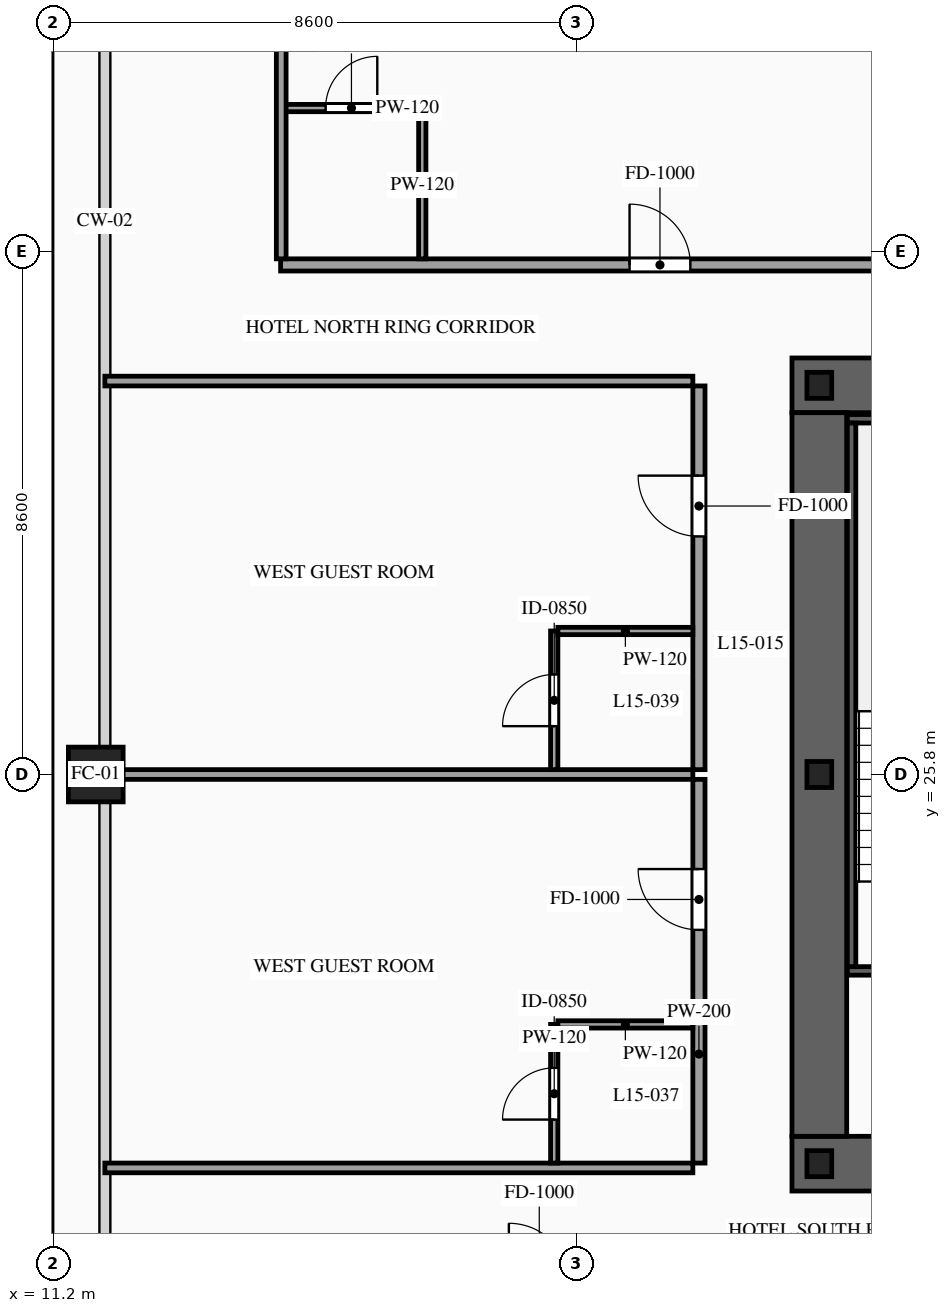
"""IFC4 building model, lengths in metres.
Left out: names, types, materials, properties, quantities, classifications, styles, units other than length and angle.
Written with IfcOpenShell. Run it as: python <this file> out.ifc"""

import sys

from ifc_helpers import new_model, si_unit, direction, frame, frame_2d, origin, origin_2d, place, context, subcontext, project, spatial, rectangle, hollow_rectangle, i_section, extrude, source, transform, mapped, element, fill, save


model = new_model("IFC4")
c1 = context("Model", 3, precision=1e-05, world=origin(), true_north=direction((0.0, 1.0)))
c2 = subcontext(c1, "Body", "Model", "MODEL_VIEW")
j1 = project(units=[si_unit("LENGTHUNIT", "METRE"), si_unit("PLANEANGLEUNIT", "RADIAN")], contexts=[c1])
p1 = place(None, origin())
s1 = spatial("IfcSite", under=j1, at=p1, CompositionType="ELEMENT")
p2 = place(p1, origin())
s2 = spatial("IfcBuilding", under=s1, at=p2, CompositionType="ELEMENT")
p3 = place(p2, frame((0.0, 0.0, 60.4)))
s3 = spatial("IfcBuildingStorey", under=s2, at=p3, CompositionType="ELEMENT", Elevation=60.4)
p4 = place(p3, frame((23.35, 19.4, 0.0), z_axis=(0.0, 0.0, 1.0), x_axis=(1.0, 0.0, 0.0)))
e1 = element("IfcWall", 1, at=p4, inside=s3, PredefinedType="SHEAR", context=c2, shape_type="SweptSolid", body=[
    extrude(rectangle(XDim=27.3, YDim=0.9, at=frame_2d((13.65, 0.0))), origin(), (0.0, 0.0, 1.0), 3.6),
])
p5 = place(p4, frame((2.1, 0.0, 0.0)))
e2 = element("IfcOpeningElement", 2, at=p5, cuts=e1, PredefinedType="OPENING", context=c2, shape_type="SweptSolid", body=[
    extrude(rectangle(XDim=1.1, YDim=2.2, at=frame_2d((0.55, 1.1))), frame((0.0, 0.465, 0.0), z_axis=(0.0, -1.0, 0.0), x_axis=(1.0, 0.0, 0.0)), (0.0, 0.0, 1.0), 0.93),
])
p6 = place(p4, frame((10.0, 0.0, 0.0)))
e3 = element("IfcOpeningElement", 3, at=p6, cuts=e1, PredefinedType="OPENING", context=c2, shape_type="SweptSolid", body=[
    extrude(rectangle(XDim=1.1, YDim=2.2, at=frame_2d((0.55, 1.1))), frame((0.0, 0.465, 0.0), z_axis=(0.0, -1.0, 0.0), x_axis=(1.0, 0.0, 0.0)), (0.0, 0.0, 1.0), 0.93),
])
p7 = place(p4, frame((23.2, 0.0, 0.0)))
e4 = element("IfcOpeningElement", 4, at=p7, cuts=e1, PredefinedType="OPENING", context=c2, shape_type="SweptSolid", body=[
    extrude(rectangle(XDim=1.1, YDim=2.2, at=frame_2d((0.55, 1.1))), frame((0.0, 0.465, 0.0), z_axis=(0.0, -1.0, 0.0), x_axis=(1.0, 0.0, 0.0)), (0.0, 0.0, 1.0), 0.93),
])
p8 = place(p4, frame((19.82, 0.0, 0.0)))
e5 = element("IfcOpeningElement", 5, at=p8, cuts=e1, PredefinedType="OPENING", context=c2, shape_type="SweptSolid", body=[
    extrude(rectangle(XDim=0.9, YDim=2.15, at=frame_2d((0.45, 1.075))), frame((0.0, 0.465, 0.0), z_axis=(0.0, -1.0, 0.0), x_axis=(1.0, 0.0, 0.0)), (0.0, 0.0, 1.0), 0.93),
])
p9 = place(p4, frame((18.38, 0.0, 0.0)))
e6 = element("IfcOpeningElement", 6, at=p9, cuts=e1, PredefinedType="OPENING", context=c2, shape_type="SweptSolid", body=[
    extrude(rectangle(XDim=0.9, YDim=2.15, at=frame_2d((0.45, 1.075))), frame((0.0, 0.465, 0.0), z_axis=(0.0, -1.0, 0.0), x_axis=(1.0, 0.0, 0.0)), (0.0, 0.0, 1.0), 0.93),
])
p10 = place(p3, frame((23.35, 32.2, 0.0), z_axis=(0.0, 0.0, 1.0), x_axis=(1.0, 0.0, 0.0)))
e7 = element("IfcWall", 7, at=p10, inside=s3, PredefinedType="SHEAR", context=c2, shape_type="SweptSolid", body=[
    extrude(rectangle(XDim=27.3, YDim=0.9, at=frame_2d((13.65, 0.0))), origin(), (0.0, 0.0, 1.0), 3.6),
])
p11 = place(p10, frame((4.72, 0.0, 0.0)))
e8 = element("IfcOpeningElement", 8, at=p11, cuts=e7, PredefinedType="OPENING", context=c2, shape_type="SweptSolid", body=[
    extrude(rectangle(XDim=0.9, YDim=2.15, at=frame_2d((0.45, 1.075))), frame((0.0, 0.465, 0.0), z_axis=(0.0, -1.0, 0.0), x_axis=(1.0, 0.0, 0.0)), (0.0, 0.0, 1.0), 0.93),
])
p12 = place(p10, frame((10.0, 0.0, 0.0)))
e9 = element("IfcOpeningElement", 9, at=p12, cuts=e7, PredefinedType="OPENING", context=c2, shape_type="SweptSolid", body=[
    extrude(rectangle(XDim=1.1, YDim=2.2, at=frame_2d((0.55, 1.1))), frame((0.0, 0.465, 0.0), z_axis=(0.0, -1.0, 0.0), x_axis=(1.0, 0.0, 0.0)), (0.0, 0.0, 1.0), 0.93),
])
p13 = place(p10, frame((15.85, 0.0, 0.0)))
e10 = element("IfcOpeningElement", 10, at=p13, cuts=e7, PredefinedType="OPENING", context=c2, shape_type="SweptSolid", body=[
    extrude(rectangle(XDim=1.1, YDim=2.2, at=frame_2d((0.55, 1.1))), frame((0.0, 0.465, 0.0), z_axis=(0.0, -1.0, 0.0), x_axis=(1.0, 0.0, 0.0)), (0.0, 0.0, 1.0), 0.93),
])
p14 = place(p10, frame((19.82, 0.0, 0.0)))
e11 = element("IfcOpeningElement", 11, at=p14, cuts=e7, PredefinedType="OPENING", context=c2, shape_type="SweptSolid", body=[
    extrude(rectangle(XDim=0.9, YDim=2.15, at=frame_2d((0.45, 1.075))), frame((0.0, 0.465, 0.0), z_axis=(0.0, -1.0, 0.0), x_axis=(1.0, 0.0, 0.0)), (0.0, 0.0, 1.0), 0.93),
])
m1 = source(origin(), c2, "Body", "SweptSolid", [
    extrude(rectangle(XDim=11.9, YDim=0.9, at=frame_2d((5.95, 0.0))), origin(), (0.0, 0.0, 1.0), 3.6),
])
p15 = place(p3, frame((23.8, 19.85, 0.0), z_axis=(0.0, 0.0, 1.0), x_axis=(0.0, 1.0, 0.0)))
e12 = element("IfcWall", 12, at=p15, inside=s3, PredefinedType="SHEAR", context=c2, shape_type="MappedRepresentation", body=[
    mapped(m1, transform((0.0, 0.0, 0.0), scale=1.0)),
])
m2 = source(origin(), c2, "Body", "SweptSolid", [
    extrude(i_section(OverallWidth=0.407, OverallDepth=0.428, WebThickness=0.02, FlangeThickness=0.035, at=origin_2d()), origin(), (0.0, 0.0, 1.0), 3.6),
])
for number, where, z_axis, x_axis in (
    (13, (23.8, 19.4, 0.0), (0.0, 0.0, 1.0), (1.0, 0.0, 0.0)),
    (14, (23.8, 25.8, 0.0), (0.0, 0.0, 1.0), (1.0, 0.0, 0.0)),
    (15, (23.8, 32.2, 0.0), (0.0, 0.0, 1.0), (1.0, 0.0, 0.0)),
):
    element("IfcColumn", number, at=place(p3, frame(where, z_axis=z_axis, x_axis=x_axis)), inside=s3, PredefinedType="COLUMN", context=c2, shape_type="MappedRepresentation", body=[
        mapped(m2, transform((0.0, 0.0, 0.0), scale=1.0)),
    ])
m3 = source(origin(), c2, "Body", "SweptSolid", [
    extrude(hollow_rectangle(XDim=0.9, YDim=0.9, WallThickness=0.042, at=origin_2d()), origin(), (0.0, 0.0, 1.0), 3.6),
])
p16 = place(p3, frame((11.9, 25.8, 0.0), z_axis=(0.0, 0.0, 1.0), x_axis=(1.0, 0.0, 0.0)))
e16 = element("IfcColumn", 16, at=p16, inside=s3, PredefinedType="COLUMN", context=c2, shape_type="MappedRepresentation", body=[
    mapped(m3, transform((0.0, 0.0, 0.0), scale=1.0)),
])
p17 = place(p3, frame((24.26, 22.57, 0.0), z_axis=(0.0, 0.0, 1.0), x_axis=(1.0, 0.0, 0.0)))
e17 = element("IfcWall", 17, at=p17, inside=s3, PredefinedType="SOLIDWALL", context=c2, shape_type="SweptSolid", body=[
    extrude(rectangle(XDim=3.28, YDim=0.14, at=frame_2d((1.64, 0.0))), origin(), (0.0, 0.0, 1.0), 3.38),
])
p18 = place(p17, frame((1.09, 0.0, 0.0)))
e18 = element("IfcOpeningElement", 18, at=p18, cuts=e17, PredefinedType="OPENING", context=c2, shape_type="SweptSolid", body=[
    extrude(rectangle(XDim=1.1, YDim=2.2, at=frame_2d((0.55, 1.1))), frame((0.0, 0.085, 0.0), z_axis=(0.0, -1.0, 0.0), x_axis=(1.0, 0.0, 0.0)), (0.0, 0.0, 1.0), 0.17),
])
m4 = source(origin(), c2, "Body", "SweptSolid", [
    extrude(rectangle(XDim=3.28, YDim=0.14, at=frame_2d((1.64, 0.0))), origin(), (0.0, 0.0, 1.0), 3.38),
])
p19 = place(p3, frame((24.26, 31.65, 0.0), z_axis=(0.0, 0.0, 1.0), x_axis=(1.0, 0.0, 0.0)))
e19 = element("IfcWall", 19, at=p19, inside=s3, PredefinedType="SOLIDWALL", context=c2, shape_type="MappedRepresentation", body=[
    mapped(m4, transform((0.0, 0.0, 0.0), scale=1.0)),
])
m5 = source(origin(), c2, "Body", "SweptSolid", [
    extrude(rectangle(XDim=8.94, YDim=0.14, at=frame_2d((4.47, 0.0))), origin(), (0.0, 0.0, 1.0), 3.38),
])
p20 = place(p3, frame((24.33, 22.64, 0.0), z_axis=(0.0, 0.0, 1.0), x_axis=(0.0, 1.0, 0.0)))
e20 = element("IfcWall", 20, at=p20, inside=s3, PredefinedType="SOLIDWALL", context=c2, shape_type="MappedRepresentation", body=[
    mapped(m5, transform((0.0, 0.0, 0.0), scale=1.0)),
])
p21 = place(p3, frame((14.94, 34.18, 0.0), z_axis=(0.0, 0.0, 1.0), x_axis=(1.0, 0.0, 0.0)))
e21 = element("IfcWall", 21, at=p21, inside=s3, PredefinedType="PARTITIONING", context=c2, shape_type="SweptSolid", body=[
    extrude(rectangle(XDim=10.068, YDim=0.2, at=frame_2d((5.034, 0.0))), origin(), (0.0, 0.0, 1.0), 3.38),
])
p22 = place(p21, frame((5.739, 0.0, 0.0)))
e22 = element("IfcOpeningElement", 22, at=p22, cuts=e21, PredefinedType="OPENING", context=c2, shape_type="SweptSolid", body=[
    extrude(rectangle(XDim=1.0, YDim=2.2, at=frame_2d((0.5, 1.1))), frame((0.0, 0.115, 0.0), z_axis=(0.0, -1.0, 0.0), x_axis=(1.0, 0.0, 0.0)), (0.0, 0.0, 1.0), 0.23),
])
p23 = place(p3, frame((14.94, 36.76, 0.0), z_axis=(0.0, 0.0, 1.0), x_axis=(1.0, 0.0, 0.0)))
e23 = element("IfcWall", 23, at=p23, inside=s3, PredefinedType="PARTITIONING", context=c2, shape_type="SweptSolid", body=[
    extrude(rectangle(XDim=2.33, YDim=0.12, at=frame_2d((1.165, 0.0))), origin(), (0.0, 0.0, 1.0), 3.38),
])
p24 = place(p23, frame((0.74, 0.0, 0.0)))
e24 = element("IfcOpeningElement", 24, at=p24, cuts=e23, PredefinedType="OPENING", context=c2, shape_type="SweptSolid", body=[
    extrude(rectangle(XDim=0.85, YDim=2.1, at=frame_2d((0.425, 1.05))), frame((0.0, 0.075, 0.0), z_axis=(0.0, -1.0, 0.0), x_axis=(1.0, 0.0, 0.0)), (0.0, 0.0, 1.0), 0.15),
])
m6 = source(origin(), c2, "Body", "SweptSolid", [
    extrude(rectangle(XDim=2.42, YDim=0.12, at=frame_2d((1.21, 0.0))), origin(), (0.0, 0.0, 1.0), 3.38),
])
p25 = place(p3, frame((17.27, 34.28, 0.0), z_axis=(0.0, 0.0, 1.0), x_axis=(0.0, 1.0, 0.0)))
e25 = element("IfcWall", 25, at=p25, inside=s3, PredefinedType="PARTITIONING", context=c2, shape_type="MappedRepresentation", body=[
    mapped(m6, transform((0.0, 0.0, 0.0), scale=1.0)),
])
m7 = source(origin(), c2, "Body", "SweptSolid", [
    extrude(rectangle(XDim=16.32, YDim=0.16, at=frame_2d((8.16, 0.0))), origin(), (0.0, 0.0, 1.0), 3.38),
])
p26 = place(p3, frame((14.95, 34.28, 0.0), z_axis=(0.0, 0.0, 1.0), x_axis=(0.0, 1.0, 0.0)))
e26 = element("IfcWall", 26, at=p26, inside=s3, PredefinedType="PARTITIONING", context=c2, shape_type="MappedRepresentation", body=[
    mapped(m7, transform((0.0, 0.0, 0.0), scale=1.0)),
])
p27 = place(p3, frame((21.82, 19.41, 0.0), z_axis=(0.0, 0.0, 1.0), x_axis=(0.0, 1.0, 0.0)))
e27 = element("IfcWall", 27, at=p27, inside=s3, PredefinedType="PARTITIONING", context=c2, shape_type="SweptSolid", body=[
    extrude(rectangle(XDim=6.31, YDim=0.2, at=frame_2d((3.155, 0.0))), origin(), (0.0, 0.0, 1.0), 3.38),
])
p28 = place(p27, frame((3.835, 0.0, 0.0)))
e28 = element("IfcOpeningElement", 28, at=p28, cuts=e27, PredefinedType="OPENING", context=c2, shape_type="SweptSolid", body=[
    extrude(rectangle(XDim=1.0, YDim=2.2, at=frame_2d((0.5, 1.1))), frame((0.0, 0.115, 0.0), z_axis=(0.0, -1.0, 0.0), x_axis=(1.0, 0.0, 0.0)), (0.0, 0.0, 1.0), 0.23),
])
m8 = source(origin(), c2, "Body", "SweptSolid", [
    extrude(rectangle(XDim=9.67, YDim=0.16, at=frame_2d((4.835, 0.0))), origin(), (0.0, 0.0, 1.0), 2.575),
])
p29 = place(p3, frame((12.05, 25.8, 0.0), z_axis=(0.0, 0.0, 1.0), x_axis=(1.0, 0.0, 0.0)))
e29 = element("IfcWall", 29, at=p29, inside=s3, PredefinedType="PARTITIONING", context=c2, shape_type="MappedRepresentation", body=[
    mapped(m8, transform((0.0, 0.0, 0.0), scale=1.0)),
])
m9 = source(origin(), c2, "Body", "SweptSolid", [
    extrude(rectangle(XDim=9.67, YDim=0.16, at=frame_2d((4.835, 0.0))), origin(), (0.0, 0.0, 1.0), 2.875),
])
p30 = place(p3, frame((12.05, 19.33, 0.0), z_axis=(0.0, 0.0, 1.0), x_axis=(1.0, 0.0, 0.0)))
e30 = element("IfcWall", 30, at=p30, inside=s3, PredefinedType="PARTITIONING", context=c2, shape_type="MappedRepresentation", body=[
    mapped(m9, transform((0.0, 0.0, 0.0), scale=1.0)),
])
p31 = place(p3, frame((19.44, 19.41, 0.0), z_axis=(0.0, 0.0, 1.0), x_axis=(0.0, 1.0, 0.0)))
e31 = element("IfcWall", 31, at=p31, inside=s3, PredefinedType="PARTITIONING", context=c2, shape_type="SweptSolid", body=[
    extrude(rectangle(XDim=2.28, YDim=0.12, at=frame_2d((1.14, 0.0))), origin(), (0.0, 0.0, 1.0), 3.38),
])
p32 = place(p31, frame((0.715, 0.0, 0.0)))
e32 = element("IfcOpeningElement", 32, at=p32, cuts=e31, PredefinedType="OPENING", context=c2, shape_type="SweptSolid", body=[
    extrude(rectangle(XDim=0.85, YDim=2.1, at=frame_2d((0.425, 1.05))), frame((0.0, 0.075, 0.0), z_axis=(0.0, -1.0, 0.0), x_axis=(1.0, 0.0, 0.0)), (0.0, 0.0, 1.0), 0.15),
])
m10 = source(origin(), c2, "Body", "SweptSolid", [
    extrude(rectangle(XDim=2.22, YDim=0.12, at=frame_2d((1.11, 0.0))), origin(), (0.0, 0.0, 1.0), 3.38),
])
p33 = place(p3, frame((19.5, 21.69, 0.0), z_axis=(0.0, 0.0, 1.0), x_axis=(1.0, 0.0, 0.0)))
e33 = element("IfcWall", 33, at=p33, inside=s3, PredefinedType="PARTITIONING", context=c2, shape_type="MappedRepresentation", body=[
    mapped(m10, transform((0.0, 0.0, 0.0), scale=1.0)),
])
p34 = place(p3, frame((21.82, 25.88, 0.0), z_axis=(0.0, 0.0, 1.0), x_axis=(0.0, 1.0, 0.0)))
e34 = element("IfcWall", 34, at=p34, inside=s3, PredefinedType="PARTITIONING", context=c2, shape_type="SweptSolid", body=[
    extrude(rectangle(XDim=6.31, YDim=0.2, at=frame_2d((3.155, 0.0))), origin(), (0.0, 0.0, 1.0), 3.38),
])
p35 = place(p34, frame((3.835, 0.0, 0.0)))
e35 = element("IfcOpeningElement", 35, at=p35, cuts=e34, PredefinedType="OPENING", context=c2, shape_type="SweptSolid", body=[
    extrude(rectangle(XDim=1.0, YDim=2.2, at=frame_2d((0.5, 1.1))), frame((0.0, 0.115, 0.0), z_axis=(0.0, -1.0, 0.0), x_axis=(1.0, 0.0, 0.0)), (0.0, 0.0, 1.0), 0.23),
])
p36 = place(p3, frame((12.05, 32.27, 0.0), z_axis=(0.0, 0.0, 1.0), x_axis=(1.0, 0.0, 0.0)))
e36 = element("IfcWall", 36, at=p36, inside=s3, PredefinedType="PARTITIONING", context=c2, shape_type="MappedRepresentation", body=[
    mapped(m9, transform((0.0, 0.0, 0.0), scale=1.0)),
])
p37 = place(p3, frame((19.44, 25.88, 0.0), z_axis=(0.0, 0.0, 1.0), x_axis=(0.0, 1.0, 0.0)))
e37 = element("IfcWall", 37, at=p37, inside=s3, PredefinedType="PARTITIONING", context=c2, shape_type="SweptSolid", body=[
    extrude(rectangle(XDim=2.28, YDim=0.12, at=frame_2d((1.14, 0.0))), origin(), (0.0, 0.0, 1.0), 3.38),
])
p38 = place(p37, frame((0.715, 0.0, 0.0)))
e38 = element("IfcOpeningElement", 38, at=p38, cuts=e37, PredefinedType="OPENING", context=c2, shape_type="SweptSolid", body=[
    extrude(rectangle(XDim=0.85, YDim=2.1, at=frame_2d((0.425, 1.05))), frame((0.0, 0.075, 0.0), z_axis=(0.0, -1.0, 0.0), x_axis=(1.0, 0.0, 0.0)), (0.0, 0.0, 1.0), 0.15),
])
p39 = place(p3, frame((19.5, 28.16, 0.0), z_axis=(0.0, 0.0, 1.0), x_axis=(1.0, 0.0, 0.0)))
e39 = element("IfcWall", 39, at=p39, inside=s3, PredefinedType="PARTITIONING", context=c2, shape_type="MappedRepresentation", body=[
    mapped(m10, transform((0.0, 0.0, 0.0), scale=1.0)),
])
m11 = source(origin(), c2, "Body", "SweptSolid", [
    extrude(rectangle(XDim=1.0, YDim=2.2, at=frame_2d((0.5, 1.1))), frame((0.0, 0.025, 0.0), z_axis=(0.0, -1.0, 0.0), x_axis=(1.0, 0.0, 0.0)), (0.0, 0.0, 1.0), 0.05),
])
p40 = place(p22, origin())
e40 = element("IfcDoor", 40, at=p40, inside=s3, OperationType="SINGLE_SWING_LEFT", PredefinedType="DOOR", context=c2, shape_type="MappedRepresentation", body=[
    mapped(m11, transform((0.0, 0.0, 0.0), scale=1.0)),
])
fill(e22, e40)
m12 = source(origin(), c2, "Body", "SweptSolid", [
    extrude(rectangle(XDim=0.85, YDim=2.1, at=frame_2d((0.425, 1.05))), frame((0.0, 0.025, 0.0), z_axis=(0.0, -1.0, 0.0), x_axis=(1.0, 0.0, 0.0)), (0.0, 0.0, 1.0), 0.05),
])
p41 = place(p24, origin())
e41 = element("IfcDoor", 41, at=p41, inside=s3, OperationType="SINGLE_SWING_RIGHT", PredefinedType="DOOR", context=c2, shape_type="MappedRepresentation", body=[
    mapped(m12, transform((0.0, 0.0, 0.0), scale=1.0)),
])
fill(e24, e41)
p42 = place(p28, origin())
e42 = element("IfcDoor", 42, at=p42, inside=s3, OperationType="SINGLE_SWING_RIGHT", PredefinedType="DOOR", context=c2, shape_type="MappedRepresentation", body=[
    mapped(m11, transform((0.0, 0.0, 0.0), scale=1.0)),
])
fill(e28, e42)
p43 = place(p32, origin())
e43 = element("IfcDoor", 43, at=p43, inside=s3, OperationType="SINGLE_SWING_LEFT", PredefinedType="DOOR", context=c2, shape_type="MappedRepresentation", body=[
    mapped(m12, transform((0.0, 0.0, 0.0), scale=1.0)),
])
fill(e32, e43)
p44 = place(p35, origin())
e44 = element("IfcDoor", 44, at=p44, inside=s3, OperationType="SINGLE_SWING_RIGHT", PredefinedType="DOOR", context=c2, shape_type="MappedRepresentation", body=[
    mapped(m11, transform((0.0, 0.0, 0.0), scale=1.0)),
])
fill(e35, e44)
p45 = place(p38, origin())
e45 = element("IfcDoor", 45, at=p45, inside=s3, OperationType="SINGLE_SWING_LEFT", PredefinedType="DOOR", context=c2, shape_type="MappedRepresentation", body=[
    mapped(m12, transform((0.0, 0.0, 0.0), scale=1.0)),
])
fill(e38, e45)
save(model, sys.argv[1])
